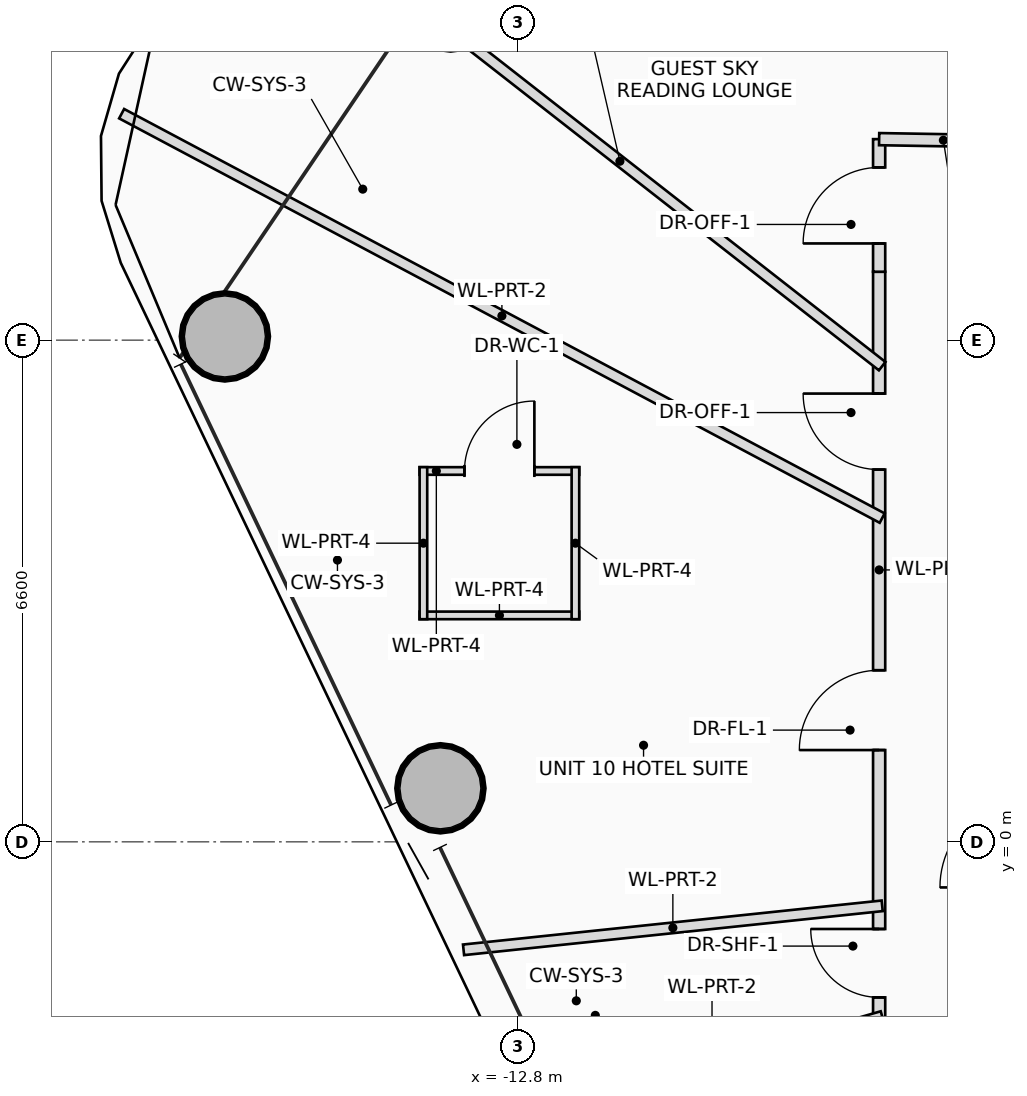
"""IFC4 building model, lengths in metres.
Left out: names, types, materials, properties, quantities, classifications, styles, units other than length and angle.
Written with IfcOpenShell. Run it as: python <this file> out.ifc"""

import sys

from ifc_helpers import new_model, si_unit, direction, frame, frame_2d, origin, origin_2d, place, context, subcontext, project, spatial, rectangle, hollow_circle, extrude, source, transform, mapped, element, fill, save


model = new_model("IFC4")
c1 = context("Model", 3, precision=1e-05, world=origin(), true_north=direction((0.0, 1.0)))
c2 = subcontext(c1, "Body", "Model", "MODEL_VIEW")
j1 = project(units=[si_unit("LENGTHUNIT", "METRE"), si_unit("PLANEANGLEUNIT", "RADIAN")], contexts=[c1])
p1 = place(None, origin())
s1 = spatial("IfcSite", under=j1, at=p1, CompositionType="ELEMENT")
p2 = place(p1, origin())
s2 = spatial("IfcBuilding", under=s1, at=p2, CompositionType="ELEMENT")
p3 = place(p2, frame((0.0, 0.0, 198.35)))
s3 = spatial("IfcBuildingStorey", under=s2, at=p3, CompositionType="ELEMENT", Elevation=198.35)
m1 = source(origin(), c2, "Body", "SweptSolid", [
    extrude(hollow_circle(Radius=0.575, WallThickness=0.042, at=origin_2d()), origin(), (0.0, 0.0, 1.0), 3.45),
])
for number, where, z_axis, x_axis in (
    (1, (-16.658, 6.649, 0.0), (0.0, 0.0, 1.0), (1.0, 0.0, 0.0)),
    (2, (-13.823, 0.704, 0.0), (0.0, 0.0, 1.0), (1.0, 0.0, 0.0)),
):
    element("IfcColumn", number, at=place(p3, frame(where, z_axis=z_axis, x_axis=x_axis)), inside=s3, PredefinedType="COLUMN", context=c2, shape_type="MappedRepresentation", body=[
        mapped(m1, transform((0.0, 0.0, 0.0), scale=1.0)),
    ])
p4 = place(p3, frame((-14.096, 4.879, 0.0), z_axis=(0.0, 0.0, 1.0), x_axis=(1.0, 0.0, 0.0)))
e3 = element("IfcWall", 3, at=p4, inside=s3, PredefinedType="PARTITIONING", context=c2, shape_type="SweptSolid", body=[
    extrude(rectangle(XDim=2.1, YDim=0.1, at=frame_2d((1.05, 0.0))), origin(), (0.0, 0.0, 1.0), 2.905),
])
p5 = place(p4, frame((0.59, 0.0, 0.0)))
e4 = element("IfcOpeningElement", 4, at=p5, cuts=e3, PredefinedType="OPENING", context=c2, shape_type="SweptSolid", body=[
    extrude(rectangle(XDim=0.92, YDim=2.1, at=frame_2d((0.46, 1.05))), frame((0.0, 0.06, 0.0), z_axis=(0.0, -1.0, 0.0), x_axis=(1.0, 0.0, 0.0)), (0.0, 0.0, 1.0), 0.12),
])
p6 = place(p3, frame((-11.996, 2.979, 0.0), z_axis=(0.0, 0.0, 1.0), x_axis=(-1.0, 0.0, 0.0)))
e5 = element("IfcWall", 5, at=p6, inside=s3, PredefinedType="PARTITIONING", context=c2, shape_type="SweptSolid", body=[
    extrude(rectangle(XDim=2.1, YDim=0.1, at=frame_2d((1.05, 0.0))), origin(), (0.0, 0.0, 1.0), 2.905),
])
for number, where, z_axis, x_axis in (
    (6, (-12.046, 4.929, 0.0), (0.0, 0.0, 1.0), (0.0, -1.0, 0.0)),
    (7, (-14.046, 2.929, 0.0), (0.0, 0.0, 1.0), (0.0, 1.0, 0.0)),
):
    element("IfcWall", number, at=place(p3, frame(where, z_axis=z_axis, x_axis=x_axis)), inside=s3, PredefinedType="PARTITIONING", context=c2, shape_type="SweptSolid", body=[
        extrude(rectangle(XDim=2.0, YDim=0.1, at=frame_2d((1.0, 0.0))), origin(), (0.0, 0.0, 1.0), 3.25),
    ])
p7 = place(p3, frame((-8.05, -7.5, 0.0), z_axis=(0.0, 0.0, 1.0), x_axis=(0.0, 1.0, 0.0)))
e8 = element("IfcWall", 8, at=p7, inside=s3, PredefinedType="PARTITIONING", context=c2, shape_type="SweptSolid", body=[
    extrude(rectangle(XDim=15.0, YDim=0.16, at=frame_2d((7.5, 0.0))), origin(), (0.0, 0.0, 1.0), 2.605),
])
p8 = place(p7, frame((2.177, 0.0, 0.0)))
e9 = element("IfcOpeningElement", 9, at=p8, cuts=e8, PredefinedType="OPENING", context=c2, shape_type="SweptSolid", body=[
    extrude(rectangle(XDim=1.0, YDim=2.25, at=frame_2d((0.5, 1.125))), frame((0.0, 0.09, 0.0), z_axis=(0.0, -1.0, 0.0), x_axis=(1.0, 0.0, 0.0)), (0.0, 0.0, 1.0), 0.18),
])
p9 = place(p7, frame((5.453, 0.0, 0.0)))
e10 = element("IfcOpeningElement", 10, at=p9, cuts=e8, PredefinedType="OPENING", context=c2, shape_type="SweptSolid", body=[
    extrude(rectangle(XDim=0.9, YDim=2.05, at=frame_2d((0.45, 1.025))), frame((0.0, 0.09, 0.0), z_axis=(0.0, -1.0, 0.0), x_axis=(1.0, 0.0, 0.0)), (0.0, 0.0, 1.0), 0.18),
])
p10 = place(p7, frame((8.707, 0.0, 0.0)))
e11 = element("IfcOpeningElement", 11, at=p10, cuts=e8, PredefinedType="OPENING", context=c2, shape_type="SweptSolid", body=[
    extrude(rectangle(XDim=1.05, YDim=2.2, at=frame_2d((0.525, 1.1))), frame((0.0, 0.09, 0.0), z_axis=(0.0, -1.0, 0.0), x_axis=(1.0, 0.0, 0.0)), (0.0, 0.0, 1.0), 0.18),
])
p11 = place(p7, frame((12.397, 0.0, 0.0)))
e12 = element("IfcOpeningElement", 12, at=p11, cuts=e8, PredefinedType="OPENING", context=c2, shape_type="SweptSolid", body=[
    extrude(rectangle(XDim=1.0, YDim=2.25, at=frame_2d((0.5, 1.125))), frame((0.0, 0.09, 0.0), z_axis=(0.0, -1.0, 0.0), x_axis=(1.0, 0.0, 0.0)), (0.0, 0.0, 1.0), 0.18),
])
p12 = place(p3, frame((-8.05, 7.5, 0.0), z_axis=(0.0, 0.0, 1.0), x_axis=(0.0, 1.0, 0.0)))
e13 = element("IfcWall", 13, at=p12, inside=s3, PredefinedType="PARTITIONING", context=c2, shape_type="SweptSolid", body=[
    extrude(rectangle(XDim=1.745, YDim=0.16, at=frame_2d((0.872, 0.0))), origin(), (0.0, 0.0, 1.0), 2.805),
])
p13 = place(p12, frame((0.372, 0.0, 0.0)))
e14 = element("IfcOpeningElement", 14, at=p13, cuts=e13, PredefinedType="OPENING", context=c2, shape_type="SweptSolid", body=[
    extrude(rectangle(XDim=1.0, YDim=2.25, at=frame_2d((0.5, 1.125))), frame((0.0, 0.09, 0.0), z_axis=(0.0, -1.0, 0.0), x_axis=(1.0, 0.0, 0.0)), (0.0, 0.0, 1.0), 0.18),
])
p14 = place(p3, frame((-8.05, 9.245, 0.0), z_axis=(0.0, 0.0, 1.0), x_axis=(0.999859611566, -0.016755809729, 0.0)))
e15 = element("IfcWall", 15, at=p14, inside=s3, PredefinedType="PARTITIONING", context=c2, shape_type="SweptSolid", body=[
    extrude(rectangle(XDim=1.69, YDim=0.16, at=frame_2d((0.845, 0.0))), origin(), (0.0, 0.0, 1.0), 2.905),
])
p15 = place(p3, frame((-8.01, 6.258, 0.0), z_axis=(0.0, 0.0, 1.0), x_axis=(-0.788015921071, 0.615654861216, 0.0)))
e16 = element("IfcWall", 16, at=p15, inside=s3, PredefinedType="PARTITIONING", context=c2, shape_type="SweptSolid", body=[
    extrude(rectangle(XDim=8.758, YDim=0.14, at=frame_2d((4.379, 0.0))), origin(), (0.0, 0.0, 1.0), 2.805),
])
p16 = place(p3, frame((-8.01, 4.259, 0.0), z_axis=(0.0, 0.0, 1.0), x_axis=(-0.882949150857, 0.469468632606, 0.0)))
e17 = element("IfcWall", 17, at=p16, inside=s3, PredefinedType="PARTITIONING", context=c2, shape_type="SweptSolid", body=[
    extrude(rectangle(XDim=11.333, YDim=0.14, at=frame_2d((5.667, 0.0))), origin(), (0.0, 0.0, 1.0), 2.605),
])
p17 = place(p3, frame((-8.01, -0.842, 0.0), z_axis=(0.0, 0.0, 1.0), x_axis=(-0.994518006468, -0.104565457063, 0.0)))
e18 = element("IfcWall", 18, at=p17, inside=s3, PredefinedType="PARTITIONING", context=c2, shape_type="SweptSolid", body=[
    extrude(rectangle(XDim=5.538, YDim=0.14, at=frame_2d((2.769, 0.0))), origin(), (0.0, 0.0, 1.0), 2.765),
])
p18 = place(p3, frame((-8.01, -2.297, 0.0), z_axis=(0.0, 0.0, 1.0), x_axis=(-0.961260451266, -0.275641696467, 0.0)))
e19 = element("IfcWall", 19, at=p18, inside=s3, PredefinedType="PARTITIONING", context=c2, shape_type="SweptSolid", body=[
    extrude(rectangle(XDim=4.658, YDim=0.14, at=frame_2d((2.329, 0.0))), origin(), (0.0, 0.0, 1.0), 2.765),
])
p19 = place(p5, origin())
e20 = element("IfcDoor", 20, at=p19, inside=s3, OperationType="SINGLE_SWING_RIGHT", PredefinedType="DOOR", context=c2, shape_type="SweptSolid", body=[
    extrude(rectangle(XDim=0.92, YDim=2.1, at=frame_2d((0.46, 1.05))), frame((0.0, 0.025, 0.0), z_axis=(0.0, -1.0, 0.0), x_axis=(1.0, 0.0, 0.0)), (0.0, 0.0, 1.0), 0.05),
])
fill(e4, e20)
p20 = place(p9, origin())
e21 = element("IfcDoor", 21, at=p20, inside=s3, OperationType="SINGLE_SWING_RIGHT", PredefinedType="DOOR", context=c2, shape_type="SweptSolid", body=[
    extrude(rectangle(XDim=0.9, YDim=2.05, at=frame_2d((0.45, 1.025))), frame((0.0, 0.025, 0.0), z_axis=(0.0, -1.0, 0.0), x_axis=(1.0, 0.0, 0.0)), (0.0, 0.0, 1.0), 0.05),
])
fill(e10, e21)
p21 = place(p10, origin())
e22 = element("IfcDoor", 22, at=p21, inside=s3, OperationType="SINGLE_SWING_LEFT", PredefinedType="DOOR", context=c2, shape_type="SweptSolid", body=[
    extrude(rectangle(XDim=1.05, YDim=2.2, at=frame_2d((0.525, 1.1))), frame((0.0, 0.025, 0.0), z_axis=(0.0, -1.0, 0.0), x_axis=(1.0, 0.0, 0.0)), (0.0, 0.0, 1.0), 0.05),
])
fill(e11, e22)
p22 = place(p11, origin())
e23 = element("IfcDoor", 23, at=p22, inside=s3, OperationType="SINGLE_SWING_RIGHT", PredefinedType="DOOR", context=c2, shape_type="SweptSolid", body=[
    extrude(rectangle(XDim=1.0, YDim=2.25, at=frame_2d((0.5, 1.125))), frame((0.0, 0.025, 0.0), z_axis=(0.0, -1.0, 0.0), x_axis=(1.0, 0.0, 0.0)), (0.0, 0.0, 1.0), 0.05),
])
fill(e12, e23)
p23 = place(p13, origin())
e24 = element("IfcDoor", 24, at=p23, inside=s3, OperationType="SINGLE_SWING_LEFT", PredefinedType="DOOR", context=c2, shape_type="SweptSolid", body=[
    extrude(rectangle(XDim=1.0, YDim=2.25, at=frame_2d((0.5, 1.125))), frame((0.0, 0.025, 0.0), z_axis=(0.0, -1.0, 0.0), x_axis=(1.0, 0.0, 0.0)), (0.0, 0.0, 1.0), 0.05),
])
fill(e14, e24)
save(model, sys.argv[1])
